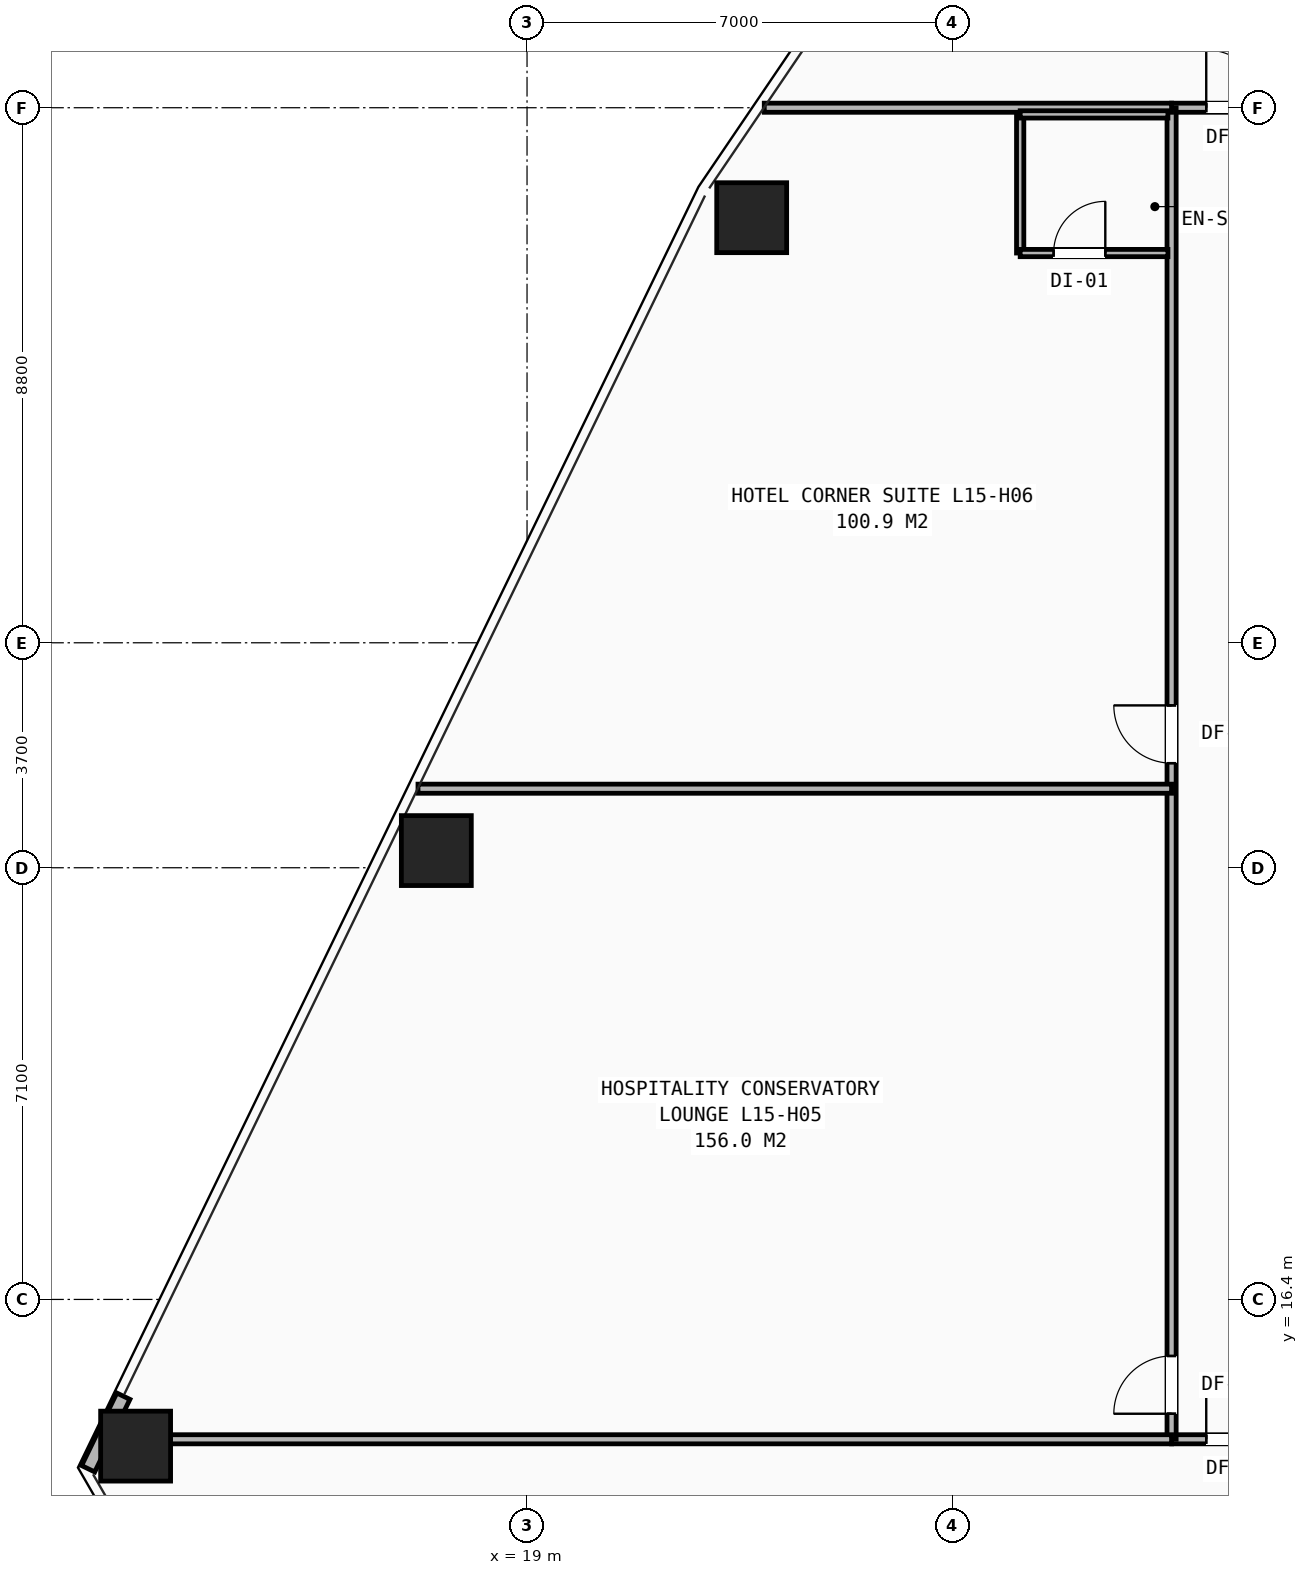
"""IFC4 building model, lengths in metres.
Left out: names, types, materials, properties, quantities, classifications, styles, units other than length and angle.
Written with IfcOpenShell. Run it as: python <this file> out.ifc"""

import sys

from ifc_helpers import new_model, si_unit, direction, frame, frame_2d, origin, origin_2d, place, context, subcontext, project, spatial, rectangle, hollow_rectangle, extrude, element, fill, save


model = new_model("IFC4")
c1 = context("Model", 3, precision=1e-05, world=origin(), true_north=direction((0.0, 1.0)))
c2 = subcontext(c1, "Body", "Model", "MODEL_VIEW")
j1 = project(units=[si_unit("LENGTHUNIT", "METRE"), si_unit("PLANEANGLEUNIT", "RADIAN")], contexts=[c1])
p1 = place(None, origin())
s1 = spatial("IfcSite", under=j1, at=p1, CompositionType="ELEMENT")
p2 = place(p1, origin())
s2 = spatial("IfcBuilding", under=s1, at=p2, CompositionType="ELEMENT")
p3 = place(p2, frame((0.0, 0.0, 56.0)))
s3 = spatial("IfcBuildingStorey", under=s2, at=p3, CompositionType="ELEMENT", Elevation=56.0)
for number, where, z_axis, x_axis in (
    (1, (22.695, 34.191, 0.0), (0.0, 0.0, 1.0), (1.0, 0.0, 0.0)),
    (2, (17.508, 23.782, 0.0), (0.0, 0.0, 1.0), (1.0, 0.0, 0.0)),
    (3, (12.563, 13.988, 0.0), (0.0, 0.0, 1.0), (1.0, 0.0, 0.0)),
):
    element("IfcColumn", number, at=place(p3, frame(where, z_axis=z_axis, x_axis=x_axis)), inside=s3, PredefinedType="COLUMN", context=c2, shape_type="SweptSolid", body=[
        extrude(hollow_rectangle(XDim=1.15, YDim=1.15, WallThickness=0.075, at=origin_2d()), origin(), (0.0, 0.0, 1.0), 3.2),
    ])
p4 = place(p3, frame((12.361, 14.809, 0.0), z_axis=(0.0, 0.0, 1.0), x_axis=(-0.435989010646, -0.89995198905, 0.0)))
e4 = element("IfcWall", 4, at=p4, inside=s3, PredefinedType="SHEAR", context=c2, shape_type="SweptSolid", body=[
    extrude(rectangle(XDim=1.327, YDim=0.24, at=frame_2d((0.663, 0.0))), origin(), (0.0, 0.0, 1.0), 2.263),
])
p5 = place(p3, frame((29.6, 14.1, 0.0), z_axis=(0.0, 0.0, 1.0), x_axis=(1.0, 0.0, 0.0)))
e5 = element("IfcWall", 5, at=p5, inside=s3, PredefinedType="PARTITIONING", context=c2, shape_type="SweptSolid", body=[
    extrude(rectangle(XDim=20.8, YDim=0.15, at=frame_2d((10.4, 0.0))), origin(), (0.0, 0.0, 1.0), 2.431),
])
p6 = place(p5, frame((0.57, 0.0, 0.0)))
e6 = element("IfcOpeningElement", 6, at=p6, cuts=e5, PredefinedType="OPENING", context=c2, shape_type="SweptSolid", body=[
    extrude(rectangle(XDim=0.95, YDim=2.1, at=frame_2d((0.475, 1.05))), frame((0.0, 0.085, 0.0), z_axis=(0.0, -1.0, 0.0), x_axis=(1.0, 0.0, 0.0)), (0.0, 0.0, 1.0), 0.17),
])
p7 = place(p5, frame((4.82, 0.0, 0.0)))
e7 = element("IfcOpeningElement", 7, at=p7, cuts=e5, PredefinedType="OPENING", context=c2, shape_type="SweptSolid", body=[
    extrude(rectangle(XDim=0.95, YDim=2.1, at=frame_2d((0.475, 1.05))), frame((0.0, 0.085, 0.0), z_axis=(0.0, -1.0, 0.0), x_axis=(1.0, 0.0, 0.0)), (0.0, 0.0, 1.0), 0.17),
])
p8 = place(p5, frame((10.82, 0.0, 0.0)))
e8 = element("IfcOpeningElement", 8, at=p8, cuts=e5, PredefinedType="OPENING", context=c2, shape_type="SweptSolid", body=[
    extrude(rectangle(XDim=0.95, YDim=2.1, at=frame_2d((0.475, 1.05))), frame((0.0, 0.085, 0.0), z_axis=(0.0, -1.0, 0.0), x_axis=(1.0, 0.0, 0.0)), (0.0, 0.0, 1.0), 0.17),
])
p9 = place(p5, frame((16.82, 0.0, 0.0)))
e9 = element("IfcOpeningElement", 9, at=p9, cuts=e5, PredefinedType="OPENING", context=c2, shape_type="SweptSolid", body=[
    extrude(rectangle(XDim=0.95, YDim=2.1, at=frame_2d((0.475, 1.05))), frame((0.0, 0.085, 0.0), z_axis=(0.0, -1.0, 0.0), x_axis=(1.0, 0.0, 0.0)), (0.0, 0.0, 1.0), 0.17),
])
p10 = place(p3, frame((29.6, 36.0, 0.0), z_axis=(0.0, 0.0, 1.0), x_axis=(1.0, 0.0, 0.0)))
e10 = element("IfcWall", 10, at=p10, inside=s3, PredefinedType="PARTITIONING", context=c2, shape_type="SweptSolid", body=[
    extrude(rectangle(XDim=9.65, YDim=0.15, at=frame_2d((4.825, 0.0))), origin(), (0.0, 0.0, 1.0), 2.98),
])
p11 = place(p10, frame((0.57, 0.0, 0.0)))
e11 = element("IfcOpeningElement", 11, at=p11, cuts=e10, PredefinedType="OPENING", context=c2, shape_type="SweptSolid", body=[
    extrude(rectangle(XDim=0.95, YDim=2.1, at=frame_2d((0.475, 1.05))), frame((0.0, 0.085, 0.0), z_axis=(0.0, -1.0, 0.0), x_axis=(1.0, 0.0, 0.0)), (0.0, 0.0, 1.0), 0.17),
])
p12 = place(p10, frame((8.02, 0.0, 0.0)))
e12 = element("IfcOpeningElement", 12, at=p12, cuts=e10, PredefinedType="OPENING", context=c2, shape_type="SweptSolid", body=[
    extrude(rectangle(XDim=0.95, YDim=2.1, at=frame_2d((0.475, 1.05))), frame((0.0, 0.085, 0.0), z_axis=(0.0, -1.0, 0.0), x_axis=(1.0, 0.0, 0.0)), (0.0, 0.0, 1.0), 0.17),
])
p13 = place(p3, frame((29.6, 14.1, 0.0), z_axis=(0.0, 0.0, 1.0), x_axis=(0.0, 1.0, 0.0)))
e13 = element("IfcWall", 13, at=p13, inside=s3, PredefinedType="PARTITIONING", context=c2, shape_type="SweptSolid", body=[
    extrude(rectangle(XDim=21.9, YDim=0.15, at=frame_2d((10.95, 0.0))), origin(), (0.0, 0.0, 1.0), 2.431),
])
p14 = place(p13, frame((0.42, 0.0, 0.0)))
e14 = element("IfcOpeningElement", 14, at=p14, cuts=e13, PredefinedType="OPENING", context=c2, shape_type="SweptSolid", body=[
    extrude(rectangle(XDim=0.95, YDim=2.1, at=frame_2d((0.475, 1.05))), frame((0.0, 0.085, 0.0), z_axis=(0.0, -1.0, 0.0), x_axis=(1.0, 0.0, 0.0)), (0.0, 0.0, 1.0), 0.17),
])
p15 = place(p13, frame((11.12, 0.0, 0.0)))
e15 = element("IfcOpeningElement", 15, at=p15, cuts=e13, PredefinedType="OPENING", context=c2, shape_type="SweptSolid", body=[
    extrude(rectangle(XDim=0.95, YDim=2.1, at=frame_2d((0.475, 1.05))), frame((0.0, 0.085, 0.0), z_axis=(0.0, -1.0, 0.0), x_axis=(1.0, 0.0, 0.0)), (0.0, 0.0, 1.0), 0.17),
])
p16 = place(p3, frame((12.023, 14.1, 0.0), z_axis=(0.0, 0.0, 1.0), x_axis=(1.0, 0.0, 0.0)))
e16 = element("IfcWall", 16, at=p16, inside=s3, PredefinedType="PARTITIONING", context=c2, shape_type="SweptSolid", body=[
    extrude(rectangle(XDim=17.577, YDim=0.15, at=frame_2d((8.789, 0.0))), origin(), (0.0, 0.0, 1.0), 2.268),
])
p17 = place(p3, frame((22.901, 36.0, 0.0), z_axis=(0.0, 0.0, 1.0), x_axis=(1.0, 0.0, 0.0)))
e17 = element("IfcWall", 17, at=p17, inside=s3, PredefinedType="PARTITIONING", context=c2, shape_type="SweptSolid", body=[
    extrude(rectangle(XDim=6.699, YDim=0.15, at=frame_2d((3.349, 0.0))), origin(), (0.0, 0.0, 1.0), 2.268),
])
p18 = place(p3, frame((17.207, 24.8, 0.0), z_axis=(0.0, 0.0, 1.0), x_axis=(1.0, 0.0, 0.0)))
e18 = element("IfcWall", 18, at=p18, inside=s3, PredefinedType="PARTITIONING", context=c2, shape_type="SweptSolid", body=[
    extrude(rectangle(XDim=12.393, YDim=0.15, at=frame_2d((6.197, 0.0))), origin(), (0.0, 0.0, 1.0), 2.268),
])
p19 = place(p3, frame((27.11, 33.61, 0.0), z_axis=(0.0, 0.0, 1.0), x_axis=(0.0, 1.0, 0.0)))
e19 = element("IfcWall", 19, at=p19, inside=s3, PredefinedType="PARTITIONING", context=c2, shape_type="SweptSolid", body=[
    extrude(rectangle(XDim=2.28, YDim=0.12, at=frame_2d((1.14, 0.0))), origin(), (0.0, 0.0, 1.0), 2.513),
])
p20 = place(p3, frame((27.11, 33.61, 0.0), z_axis=(0.0, 0.0, 1.0), x_axis=(1.0, 0.0, 0.0)))
e20 = element("IfcWall", 20, at=p20, inside=s3, PredefinedType="PARTITIONING", context=c2, shape_type="SweptSolid", body=[
    extrude(rectangle(XDim=2.43, YDim=0.12, at=frame_2d((1.215, 0.0))), origin(), (0.0, 0.0, 1.0), 2.513),
])
p21 = place(p20, frame((0.55, 0.0, 0.0)))
e21 = element("IfcOpeningElement", 21, at=p21, cuts=e20, PredefinedType="OPENING", context=c2, shape_type="SweptSolid", body=[
    extrude(rectangle(XDim=0.85, YDim=2.05, at=frame_2d((0.425, 1.025))), frame((0.0, 0.07, 0.0), z_axis=(0.0, -1.0, 0.0), x_axis=(1.0, 0.0, 0.0)), (0.0, 0.0, 1.0), 0.14),
])
p22 = place(p3, frame((27.11, 35.89, 0.0), z_axis=(0.0, 0.0, 1.0), x_axis=(1.0, 0.0, 0.0)))
e22 = element("IfcWall", 22, at=p22, inside=s3, PredefinedType="PARTITIONING", context=c2, shape_type="SweptSolid", body=[
    extrude(rectangle(XDim=2.43, YDim=0.12, at=frame_2d((1.215, 0.0))), origin(), (0.0, 0.0, 1.0), 2.513),
])
p23 = place(p6, origin())
e23 = element("IfcDoor", 23, at=p23, inside=s3, OperationType="SINGLE_SWING_LEFT", PredefinedType="DOOR", context=c2, shape_type="SweptSolid", body=[
    extrude(rectangle(XDim=0.95, YDim=2.1, at=frame_2d((0.475, 1.05))), frame((0.0, 0.025, 0.0), z_axis=(0.0, -1.0, 0.0), x_axis=(1.0, 0.0, 0.0)), (0.0, 0.0, 1.0), 0.05),
])
fill(e6, e23)
p24 = place(p14, origin())
e24 = element("IfcDoor", 24, at=p24, inside=s3, OperationType="SINGLE_SWING_LEFT", PredefinedType="DOOR", context=c2, shape_type="SweptSolid", body=[
    extrude(rectangle(XDim=0.95, YDim=2.1, at=frame_2d((0.475, 1.05))), frame((0.0, 0.025, 0.0), z_axis=(0.0, -1.0, 0.0), x_axis=(1.0, 0.0, 0.0)), (0.0, 0.0, 1.0), 0.05),
])
fill(e14, e24)
p25 = place(p15, origin())
e25 = element("IfcDoor", 25, at=p25, inside=s3, OperationType="SINGLE_SWING_RIGHT", PredefinedType="DOOR", context=c2, shape_type="SweptSolid", body=[
    extrude(rectangle(XDim=0.95, YDim=2.1, at=frame_2d((0.475, 1.05))), frame((0.0, 0.025, 0.0), z_axis=(0.0, -1.0, 0.0), x_axis=(1.0, 0.0, 0.0)), (0.0, 0.0, 1.0), 0.05),
])
fill(e15, e25)
p26 = place(p21, origin())
e26 = element("IfcDoor", 26, at=p26, inside=s3, OperationType="SINGLE_SWING_RIGHT", PredefinedType="DOOR", context=c2, shape_type="SweptSolid", body=[
    extrude(rectangle(XDim=0.85, YDim=2.05, at=frame_2d((0.425, 1.025))), frame((0.0, 0.025, 0.0), z_axis=(0.0, -1.0, 0.0), x_axis=(1.0, 0.0, 0.0)), (0.0, 0.0, 1.0), 0.05),
])
fill(e21, e26)
p27 = place(p11, origin())
e27 = element("IfcDoor", 27, at=p27, inside=s3, OperationType="SINGLE_SWING_LEFT", PredefinedType="DOOR", context=c2, shape_type="SweptSolid", body=[
    extrude(rectangle(XDim=0.95, YDim=2.1, at=frame_2d((0.475, 1.05))), frame((0.0, 0.025, 0.0), z_axis=(0.0, -1.0, 0.0), x_axis=(1.0, 0.0, 0.0)), (0.0, 0.0, 1.0), 0.05),
])
fill(e11, e27)
save(model, sys.argv[1])
